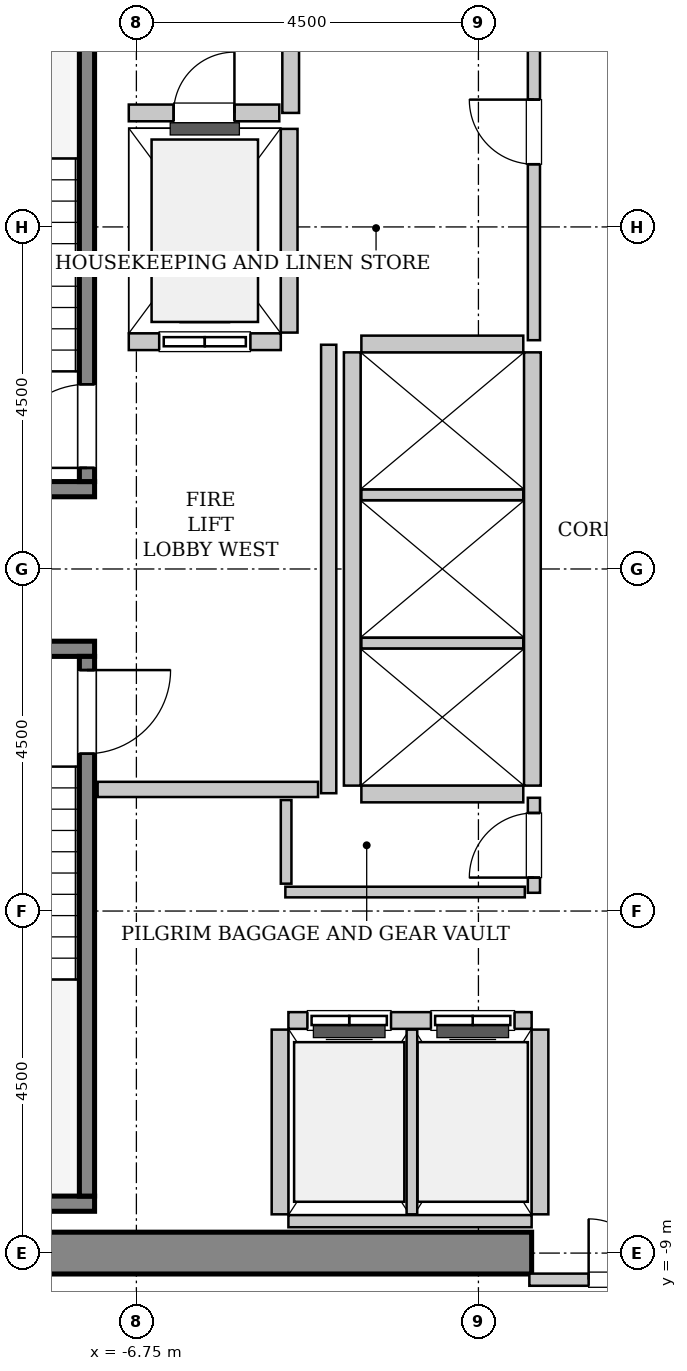
"""IFC4 building model, lengths in metres.
Left out: names, types, materials, properties, quantities, classifications, styles, units other than length and angle.
Written with IfcOpenShell. Run it as: python <this file> out.ifc"""

import sys

from ifc_helpers import new_model, si_unit, direction, frame, frame_2d, origin, place, context, subcontext, project, spatial, rectangle, extrude, source, transform, mapped, element, fill, save


model = new_model("IFC4")
c1 = context("Model", 3, precision=1e-05, world=origin(), true_north=direction((0.0, 1.0)))
c2 = subcontext(c1, "Body", "Model", "MODEL_VIEW")
j1 = project(units=[si_unit("LENGTHUNIT", "METRE"), si_unit("PLANEANGLEUNIT", "RADIAN")], contexts=[c1])
p1 = place(None, origin())
s1 = spatial("IfcSite", under=j1, at=p1, CompositionType="ELEMENT")
p2 = place(p1, origin())
s2 = spatial("IfcBuilding", under=s1, at=p2, CompositionType="ELEMENT")
p3 = place(p2, frame((0.0, 0.0, 190.6)))
s3 = spatial("IfcBuildingStorey", under=s2, at=p3, CompositionType="ELEMENT", Elevation=190.6)
m1 = source(origin(), c2, "Body", "SweptSolid", [
    extrude(rectangle(XDim=9.975, YDim=0.55, at=frame_2d((4.987, 0.0))), origin(), (0.0, 0.0, 1.0), 3.8),
])
p4 = place(p3, frame((-11.525, -9.0, 0.0), z_axis=(0.0, 0.0, 1.0), x_axis=(1.0, 0.0, 0.0)))
e1 = element("IfcWall", 1, at=p4, inside=s3, PredefinedType="SHEAR", context=c2, shape_type="MappedRepresentation", body=[
    mapped(m1, transform((0.0, 0.0, 0.0), x_axis=(1.0, 0.0, 0.0), y_axis=(0.0, 1.0, 0.0), z_axis=(0.0, 0.0, 1.0), scale=1.0)),
])
m2 = source(origin(), c2, "Body", "SweptSolid", [
    extrude(rectangle(XDim=3.4, YDim=0.2, at=frame_2d((1.7, 0.0))), origin(), (0.0, 0.0, 1.0), 3.8),
])
p5 = place(p3, frame((-7.3, 1.05, 0.0), z_axis=(0.0, 0.0, 1.0), x_axis=(-1.0, 0.0, 0.0)))
e2 = element("IfcWall", 2, at=p5, inside=s3, PredefinedType="SOLIDWALL", context=c2, shape_type="MappedRepresentation", body=[
    mapped(m2, transform((0.0, 0.0, 0.0), x_axis=(1.0, 0.0, 0.0), y_axis=(0.0, 1.0, 0.0), z_axis=(0.0, 0.0, 1.0), scale=1.0)),
])
m3 = source(origin(), c2, "Body", "SweptSolid", [
    extrude(rectangle(XDim=7.1, YDim=0.2, at=frame_2d((3.55, 0.0))), origin(), (0.0, 0.0, 1.0), 3.8),
])
p6 = place(p3, frame((-7.4, 1.15, 0.0), z_axis=(0.0, 0.0, 1.0), x_axis=(0.0, 1.0, 0.0)))
e3 = element("IfcWall", 3, at=p6, inside=s3, PredefinedType="SOLIDWALL", context=c2, shape_type="MappedRepresentation", body=[
    mapped(m3, transform((0.0, 0.0, 0.0), x_axis=(1.0, 0.0, 0.0), y_axis=(0.0, 1.0, 0.0), z_axis=(0.0, 0.0, 1.0), scale=1.0)),
])
p7 = place(p6, frame((0.18, 0.0, 0.0)))
e4 = element("IfcOpeningElement", 4, at=p7, cuts=e3, PredefinedType="OPENING", context=c2, shape_type="SweptSolid", body=[
    extrude(rectangle(XDim=1.1, YDim=2.15, at=frame_2d((0.55, 1.075))), frame((0.0, 0.11, 0.0), z_axis=(0.0, -1.0, 0.0), x_axis=(1.0, 0.0, 0.0)), (0.0, 0.0, 1.0), 0.22),
])
p8 = place(p3, frame((-10.7, -1.05, 0.0), z_axis=(0.0, 0.0, 1.0), x_axis=(1.0, 0.0, 0.0)))
e5 = element("IfcWall", 5, at=p8, inside=s3, PredefinedType="SOLIDWALL", context=c2, shape_type="MappedRepresentation", body=[
    mapped(m2, transform((0.0, 0.0, 0.0), x_axis=(1.0, 0.0, 0.0), y_axis=(0.0, 1.0, 0.0), z_axis=(0.0, 0.0, 1.0), scale=1.0)),
])
m4 = source(origin(), c2, "Body", "SweptSolid", [
    extrude(rectangle(XDim=3.68, YDim=0.2, at=frame_2d((1.84, 0.0))), origin(), (0.0, 0.0, 1.0), 3.8),
])
p9 = place(p3, frame((-10.98, -8.35, 0.0), z_axis=(0.0, 0.0, 1.0), x_axis=(1.0, 0.0, 0.0)))
e6 = element("IfcWall", 6, at=p9, inside=s3, PredefinedType="SOLIDWALL", context=c2, shape_type="MappedRepresentation", body=[
    mapped(m4, transform((0.0, 0.0, 0.0), x_axis=(1.0, 0.0, 0.0), y_axis=(0.0, 1.0, 0.0), z_axis=(0.0, 0.0, 1.0), scale=1.0)),
])
p10 = place(p3, frame((-7.4, -1.15, 0.0), z_axis=(0.0, 0.0, 1.0), x_axis=(0.0, -1.0, 0.0)))
e7 = element("IfcWall", 7, at=p10, inside=s3, PredefinedType="SOLIDWALL", context=c2, shape_type="MappedRepresentation", body=[
    mapped(m3, transform((0.0, 0.0, 0.0), x_axis=(1.0, 0.0, 0.0), y_axis=(0.0, 1.0, 0.0), z_axis=(0.0, 0.0, 1.0), scale=1.0)),
])
p11 = place(p10, frame((0.18, 0.0, 0.0)))
e8 = element("IfcOpeningElement", 8, at=p11, cuts=e7, PredefinedType="OPENING", context=c2, shape_type="SweptSolid", body=[
    extrude(rectangle(XDim=1.1, YDim=2.15, at=frame_2d((0.55, 1.075))), frame((0.0, 0.11, 0.0), z_axis=(0.0, -1.0, 0.0), x_axis=(1.0, 0.0, 0.0)), (0.0, 0.0, 1.0), 0.22),
])
m5 = source(origin(), c2, "Body", "SweptSolid", [
    extrude(rectangle(XDim=2.0, YDim=0.22, at=frame_2d((1.0, 0.0))), origin(), (0.0, 0.0, 1.0), 3.535),
])
p12 = place(p3, frame((-6.85, 2.99, 0.0), z_axis=(0.0, 0.0, 1.0), x_axis=(1.0, 0.0, 0.0)))
e9 = element("IfcWall", 9, at=p12, inside=s3, PredefinedType="SOLIDWALL", context=c2, shape_type="MappedRepresentation", body=[
    mapped(m5, transform((0.0, 0.0, 0.0), x_axis=(1.0, 0.0, 0.0), y_axis=(0.0, 1.0, 0.0), z_axis=(0.0, 0.0, 1.0), scale=1.0)),
])
p13 = place(p12, frame((0.4, 0.0, 0.0)))
e10 = element("IfcOpeningElement", 10, at=p13, cuts=e9, PredefinedType="OPENING", context=c2, shape_type="SweptSolid", body=[
    extrude(rectangle(XDim=1.2, YDim=2.2, at=frame_2d((0.6, 1.1))), frame((0.0, 0.12, 0.0), z_axis=(0.0, -1.0, 0.0), x_axis=(1.0, 0.0, 0.0)), (0.0, 0.0, 1.0), 0.24),
])
m6 = source(origin(), c2, "Body", "SweptSolid", [
    extrude(rectangle(XDim=2.68, YDim=0.22, at=frame_2d((1.34, 0.0))), origin(), (0.0, 0.0, 1.0), 3.535),
])
p14 = place(p3, frame((-4.74, 3.11, 0.0), z_axis=(0.0, 0.0, 1.0), x_axis=(0.0, 1.0, 0.0)))
e11 = element("IfcWall", 11, at=p14, inside=s3, PredefinedType="SOLIDWALL", context=c2, shape_type="MappedRepresentation", body=[
    mapped(m6, transform((0.0, 0.0, 0.0), x_axis=(1.0, 0.0, 0.0), y_axis=(0.0, 1.0, 0.0), z_axis=(0.0, 0.0, 1.0), scale=1.0)),
])
m7 = source(origin(), c2, "Body", "SweptSolid", [
    extrude(rectangle(XDim=3.2, YDim=0.22, at=frame_2d((1.6, 0.0))), origin(), (0.0, 0.0, 1.0), 3.535),
])
p15 = place(p3, frame((-1.55, -5.94, 0.0), z_axis=(0.0, 0.0, 1.0), x_axis=(-1.0, 0.0, 0.0)))
e12 = element("IfcWall", 12, at=p15, inside=s3, PredefinedType="SOLIDWALL", context=c2, shape_type="MappedRepresentation", body=[
    mapped(m7, transform((0.0, 0.0, 0.0), x_axis=(1.0, 0.0, 0.0), y_axis=(0.0, 1.0, 0.0), z_axis=(0.0, 0.0, 1.0), scale=1.0)),
])
p16 = place(p15, frame((1.85, 0.0, 0.0)))
e13 = element("IfcOpeningElement", 13, at=p16, cuts=e12, PredefinedType="OPENING", context=c2, shape_type="SweptSolid", body=[
    extrude(rectangle(XDim=1.1, YDim=2.2, at=frame_2d((0.55, 1.1))), frame((0.0, 0.12, 0.0), z_axis=(0.0, -1.0, 0.0), x_axis=(1.0, 0.0, 0.0)), (0.0, 0.0, 1.0), 0.24),
])
p17 = place(p15, frame((0.225, 0.0, 0.0)))
e14 = element("IfcOpeningElement", 14, at=p17, cuts=e12, PredefinedType="OPENING", context=c2, shape_type="SweptSolid", body=[
    extrude(rectangle(XDim=1.1, YDim=2.2, at=frame_2d((0.55, 1.1))), frame((0.0, 0.12, 0.0), z_axis=(0.0, -1.0, 0.0), x_axis=(1.0, 0.0, 0.0)), (0.0, 0.0, 1.0), 0.24),
])
m8 = source(origin(), c2, "Body", "SweptSolid", [
    extrude(rectangle(XDim=3.2, YDim=0.16, at=frame_2d((1.6, 0.0))), origin(), (0.0, 0.0, 1.0), 2.425),
])
p18 = place(p3, frame((-4.75, -8.58, 0.0), z_axis=(0.0, 0.0, 1.0), x_axis=(1.0, 0.0, 0.0)))
e15 = element("IfcWall", 15, at=p18, inside=s3, PredefinedType="PARTITIONING", context=c2, shape_type="MappedRepresentation", body=[
    mapped(m8, transform((0.0, 0.0, 0.0), x_axis=(1.0, 0.0, 0.0), y_axis=(0.0, 1.0, 0.0), z_axis=(0.0, 0.0, 1.0), scale=1.0)),
])
m9 = source(origin(), c2, "Body", "SweptSolid", [
    extrude(rectangle(XDim=2.43, YDim=0.22, at=frame_2d((1.215, 0.0))), origin(), (0.0, 0.0, 1.0), 3.535),
])
p19 = place(p3, frame((-4.86, -6.06, 0.0), z_axis=(0.0, 0.0, 1.0), x_axis=(0.0, -1.0, 0.0)))
e16 = element("IfcWall", 16, at=p19, inside=s3, PredefinedType="SOLIDWALL", context=c2, shape_type="MappedRepresentation", body=[
    mapped(m9, transform((0.0, 0.0, 0.0), x_axis=(1.0, 0.0, 0.0), y_axis=(0.0, 1.0, 0.0), z_axis=(0.0, 0.0, 1.0), scale=1.0)),
])
m10 = source(origin(), c2, "Body", "SweptSolid", [
    extrude(rectangle(XDim=2.43, YDim=0.14, at=frame_2d((1.215, 0.0))), origin(), (0.0, 0.0, 1.0), 3.535),
])
p20 = place(p3, frame((-3.125, -8.49, 0.0), z_axis=(0.0, 0.0, 1.0), x_axis=(0.0, 1.0, 0.0)))
e17 = element("IfcWall", 17, at=p20, inside=s3, PredefinedType="PARTITIONING", context=c2, shape_type="MappedRepresentation", body=[
    mapped(m10, transform((0.0, 0.0, 0.0), x_axis=(1.0, 0.0, 0.0), y_axis=(0.0, 1.0, 0.0), z_axis=(0.0, 0.0, 1.0), scale=1.0)),
])
p21 = place(p3, frame((-1.44, -8.49, 0.0), z_axis=(0.0, 0.0, 1.0), x_axis=(0.0, 1.0, 0.0)))
e18 = element("IfcWall", 18, at=p21, inside=s3, PredefinedType="SOLIDWALL", context=c2, shape_type="MappedRepresentation", body=[
    mapped(m9, transform((0.0, 0.0, 0.0), x_axis=(1.0, 0.0, 0.0), y_axis=(0.0, 1.0, 0.0), z_axis=(0.0, 0.0, 1.0), scale=1.0)),
])
m11 = source(origin(), c2, "Body", "SweptSolid", [
    extrude(rectangle(XDim=5.7, YDim=0.22, at=frame_2d((2.85, 0.0))), origin(), (0.0, 0.0, 1.0), 3.535),
])
for number, where, z_axis, x_axis in (
    (19, (-1.54, -2.85, 0.0), (0.0, 0.0, 1.0), (0.0, 1.0, 0.0)),
    (20, (-3.91, 2.85, 0.0), (0.0, 0.0, 1.0), (0.0, -1.0, 0.0)),
):
    element("IfcWall", number, at=place(p3, frame(where, z_axis=z_axis, x_axis=x_axis)), inside=s3, PredefinedType="SOLIDWALL", context=c2, shape_type="MappedRepresentation", body=[
        mapped(m11, transform((0.0, 0.0, 0.0), x_axis=(1.0, 0.0, 0.0), y_axis=(0.0, 1.0, 0.0), z_axis=(0.0, 0.0, 1.0), scale=1.0)),
    ])
m12 = source(origin(), c2, "Body", "SweptSolid", [
    extrude(rectangle(XDim=2.13, YDim=0.22, at=frame_2d((1.065, 0.0))), origin(), (0.0, 0.0, 1.0), 3.535),
])
p22 = place(p3, frame((-3.79, -2.96, 0.0), z_axis=(0.0, 0.0, 1.0), x_axis=(1.0, 0.0, 0.0)))
e21 = element("IfcWall", 21, at=p22, inside=s3, PredefinedType="SOLIDWALL", context=c2, shape_type="MappedRepresentation", body=[
    mapped(m12, transform((0.0, 0.0, 0.0), x_axis=(1.0, 0.0, 0.0), y_axis=(0.0, 1.0, 0.0), z_axis=(0.0, 0.0, 1.0), scale=1.0)),
])
m13 = source(origin(), c2, "Body", "SweptSolid", [
    extrude(rectangle(XDim=2.13, YDim=0.14, at=frame_2d((1.065, 0.0))), origin(), (0.0, 0.0, 1.0), 3.535),
])
for number, where, z_axis, x_axis in (
    (22, (-3.79, -0.975, 0.0), (0.0, 0.0, 1.0), (1.0, 0.0, 0.0)),
    (23, (-3.79, 0.975, 0.0), (0.0, 0.0, 1.0), (1.0, 0.0, 0.0)),
):
    element("IfcWall", number, at=place(p3, frame(where, z_axis=z_axis, x_axis=x_axis)), inside=s3, PredefinedType="PARTITIONING", context=c2, shape_type="MappedRepresentation", body=[
        mapped(m13, transform((0.0, 0.0, 0.0), x_axis=(1.0, 0.0, 0.0), y_axis=(0.0, 1.0, 0.0), z_axis=(0.0, 0.0, 1.0), scale=1.0)),
    ])
p23 = place(p3, frame((-1.66, 2.96, 0.0), z_axis=(0.0, 0.0, 1.0), x_axis=(-1.0, 0.0, 0.0)))
e24 = element("IfcWall", 24, at=p23, inside=s3, PredefinedType="SOLIDWALL", context=c2, shape_type="MappedRepresentation", body=[
    mapped(m12, transform((0.0, 0.0, 0.0), x_axis=(1.0, 0.0, 0.0), y_axis=(0.0, 1.0, 0.0), z_axis=(0.0, 0.0, 1.0), scale=1.0)),
])
m14 = source(origin(), c2, "Body", "SweptSolid", [
    extrude(rectangle(XDim=2.25, YDim=0.22, at=frame_2d((1.125, 0.0))), origin(), (0.0, 0.0, 1.0), 3.535),
])
p24 = place(p3, frame((-4.72, 6.0, 0.0), z_axis=(0.0, 0.0, 1.0), x_axis=(0.0, 1.0, 0.0)))
e25 = element("IfcWall", 25, at=p24, inside=s3, PredefinedType="SOLIDWALL", context=c2, shape_type="MappedRepresentation", body=[
    mapped(m14, transform((0.0, 0.0, 0.0), x_axis=(1.0, 0.0, 0.0), y_axis=(0.0, 1.0, 0.0), z_axis=(0.0, 0.0, 1.0), scale=1.0)),
])
m15 = source(origin(), c2, "Body", "SweptSolid", [
    extrude(rectangle(XDim=1.98, YDim=0.22, at=frame_2d((0.99, 0.0))), origin(), (0.0, 0.0, 1.0), 3.535),
])
p25 = place(p3, frame((-6.85, 6.0, 0.0), z_axis=(0.0, 0.0, 1.0), x_axis=(1.0, 0.0, 0.0)))
e26 = element("IfcWall", 26, at=p25, inside=s3, PredefinedType="SOLIDWALL", context=c2, shape_type="MappedRepresentation", body=[
    mapped(m15, transform((0.0, 0.0, 0.0), x_axis=(1.0, 0.0, 0.0), y_axis=(0.0, 1.0, 0.0), z_axis=(0.0, 0.0, 1.0), scale=1.0)),
])
p26 = place(p25, frame((0.59, 0.0, 0.0)))
e27 = element("IfcOpeningElement", 27, at=p26, cuts=e26, PredefinedType="OPENING", context=c2, shape_type="SweptSolid", body=[
    extrude(rectangle(XDim=0.8, YDim=2.0, at=frame_2d((0.4, 1.0))), frame((0.0, 0.12, 0.0), z_axis=(0.0, -1.0, 0.0), x_axis=(1.0, 0.0, 0.0)), (0.0, 0.0, 1.0), 0.24),
])
m16 = source(origin(), c2, "Body", "SweptSolid", [
    extrude(rectangle(XDim=5.9, YDim=0.2, at=frame_2d((2.95, 0.0))), origin(), (0.0, 0.0, 1.0), 3.535),
])
p27 = place(p3, frame((-4.22, -2.95, 0.0), z_axis=(0.0, 0.0, 1.0), x_axis=(0.0, 1.0, 0.0)))
e28 = element("IfcWall", 28, at=p27, inside=s3, PredefinedType="PARTITIONING", context=c2, shape_type="MappedRepresentation", body=[
    mapped(m16, transform((0.0, 0.0, 0.0), x_axis=(1.0, 0.0, 0.0), y_axis=(0.0, 1.0, 0.0), z_axis=(0.0, 0.0, 1.0), scale=1.0)),
])
m17 = source(origin(), c2, "Body", "SweptSolid", [
    extrude(rectangle(XDim=2.9, YDim=0.2, at=frame_2d((1.45, 0.0))), origin(), (0.0, 0.0, 1.0), 3.535),
])
p28 = place(p3, frame((-7.26, -2.9, 0.0), z_axis=(0.0, 0.0, 1.0), x_axis=(1.0, 0.0, 0.0)))
e29 = element("IfcWall", 29, at=p28, inside=s3, PredefinedType="PARTITIONING", context=c2, shape_type="MappedRepresentation", body=[
    mapped(m17, transform((0.0, 0.0, 0.0), x_axis=(1.0, 0.0, 0.0), y_axis=(0.0, 1.0, 0.0), z_axis=(0.0, 0.0, 1.0), scale=1.0)),
])
m18 = source(origin(), c2, "Body", "SweptSolid", [
    extrude(rectangle(XDim=3.16, YDim=0.16, at=frame_2d((1.58, 0.0))), origin(), (0.0, 0.0, 1.0), 2.425),
])
p29 = place(p3, frame((-1.58, -9.35, 0.0), z_axis=(0.0, 0.0, 1.0), x_axis=(1.0, 0.0, 0.0)))
e30 = element("IfcWall", 30, at=p29, inside=s3, PredefinedType="PARTITIONING", context=c2, shape_type="MappedRepresentation", body=[
    mapped(m18, transform((0.0, 0.0, 0.0), x_axis=(1.0, 0.0, 0.0), y_axis=(0.0, 1.0, 0.0), z_axis=(0.0, 0.0, 1.0), scale=1.0)),
])
p30 = place(p29, frame((0.78, 0.0, 0.0)))
e31 = element("IfcOpeningElement", 31, at=p30, cuts=e30, PredefinedType="OPENING", context=c2, shape_type="SweptSolid", body=[
    extrude(rectangle(XDim=1.6, YDim=2.3, at=frame_2d((0.8, 1.15))), frame((0.0, 0.09, 0.0), z_axis=(0.0, -1.0, 0.0), x_axis=(1.0, 0.0, 0.0)), (0.0, 0.0, 1.0), 0.18),
])
m19 = source(origin(), c2, "Body", "SweptSolid", [
    extrude(rectangle(XDim=5.48, YDim=0.16, at=frame_2d((2.74, 0.0))), origin(), (0.0, 0.0, 1.0), 3.535),
])
p31 = place(p3, frame((-1.52, 3.01, 0.0), z_axis=(0.0, 0.0, 1.0), x_axis=(0.0, 1.0, 0.0)))
e32 = element("IfcWall", 32, at=p31, inside=s3, PredefinedType="PARTITIONING", context=c2, shape_type="MappedRepresentation", body=[
    mapped(m19, transform((0.0, 0.0, 0.0), x_axis=(1.0, 0.0, 0.0), y_axis=(0.0, 1.0, 0.0), z_axis=(0.0, 0.0, 1.0), scale=1.0)),
])
p32 = place(p31, frame((2.315, 0.0, 0.0)))
e33 = element("IfcOpeningElement", 33, at=p32, cuts=e32, PredefinedType="OPENING", context=c2, shape_type="SweptSolid", body=[
    extrude(rectangle(XDim=0.85, YDim=2.1, at=frame_2d((0.425, 1.05))), frame((0.0, 0.09, 0.0), z_axis=(0.0, -1.0, 0.0), x_axis=(1.0, 0.0, 0.0)), (0.0, 0.0, 1.0), 0.18),
])
m20 = source(origin(), c2, "Body", "SweptSolid", [
    extrude(rectangle(XDim=1.25, YDim=0.16, at=frame_2d((0.625, 0.0))), origin(), (0.0, 0.0, 1.0), 3.535),
])
p33 = place(p3, frame((-1.52, -4.26, 0.0), z_axis=(0.0, 0.0, 1.0), x_axis=(0.0, 1.0, 0.0)))
e34 = element("IfcWall", 34, at=p33, inside=s3, PredefinedType="PARTITIONING", context=c2, shape_type="MappedRepresentation", body=[
    mapped(m20, transform((0.0, 0.0, 0.0), x_axis=(1.0, 0.0, 0.0), y_axis=(0.0, 1.0, 0.0), z_axis=(0.0, 0.0, 1.0), scale=1.0)),
])
p34 = place(p33, frame((0.2, 0.0, 0.0)))
e35 = element("IfcOpeningElement", 35, at=p34, cuts=e34, PredefinedType="OPENING", context=c2, shape_type="SweptSolid", body=[
    extrude(rectangle(XDim=0.85, YDim=2.1, at=frame_2d((0.425, 1.05))), frame((0.0, 0.09, 0.0), z_axis=(0.0, -1.0, 0.0), x_axis=(1.0, 0.0, 0.0)), (0.0, 0.0, 1.0), 0.18),
])
m21 = source(origin(), c2, "Body", "SweptSolid", [
    extrude(rectangle(XDim=3.15, YDim=0.14, at=frame_2d((1.575, 0.0))), origin(), (0.0, 0.0, 1.0), 3.535),
])
p35 = place(p3, frame((-4.79, -4.25, 0.0), z_axis=(0.0, 0.0, 1.0), x_axis=(1.0, 0.0, 0.0)))
e36 = element("IfcWall", 36, at=p35, inside=s3, PredefinedType="PARTITIONING", context=c2, shape_type="MappedRepresentation", body=[
    mapped(m21, transform((0.0, 0.0, 0.0), x_axis=(1.0, 0.0, 0.0), y_axis=(0.0, 1.0, 0.0), z_axis=(0.0, 0.0, 1.0), scale=1.0)),
])
m22 = source(origin(), c2, "Body", "SweptSolid", [
    extrude(rectangle(XDim=1.1, YDim=0.14, at=frame_2d((0.55, 0.0))), origin(), (0.0, 0.0, 1.0), 3.535),
])
p36 = place(p3, frame((-4.78, -4.14, 0.0), z_axis=(0.0, 0.0, 1.0), x_axis=(0.0, 1.0, 0.0)))
e37 = element("IfcWall", 37, at=p36, inside=s3, PredefinedType="PARTITIONING", context=c2, shape_type="MappedRepresentation", body=[
    mapped(m22, transform((0.0, 0.0, 0.0), x_axis=(1.0, 0.0, 0.0), y_axis=(0.0, 1.0, 0.0), z_axis=(0.0, 0.0, 1.0), scale=1.0)),
])
m23 = source(origin(), c2, "Body", "SweptSolid", [
    extrude(rectangle(XDim=1.1, YDim=2.15, at=frame_2d((0.55, 1.075))), frame((0.0, 0.025, 0.0), z_axis=(0.0, -1.0, 0.0), x_axis=(1.0, 0.0, 0.0)), (0.0, 0.0, 1.0), 0.05),
])
p37 = place(p7, origin())
e38 = element("IfcDoor", 38, at=p37, inside=s3, OperationType="SINGLE_SWING_LEFT", PredefinedType="DOOR", context=c2, shape_type="MappedRepresentation", body=[
    mapped(m23, transform((0.0, 0.0, 0.0), x_axis=(1.0, 0.0, 0.0), y_axis=(0.0, 1.0, 0.0), z_axis=(0.0, 0.0, 1.0), scale=1.0)),
])
fill(e4, e38)
p38 = place(p11, origin())
e39 = element("IfcDoor", 39, at=p38, inside=s3, OperationType="SINGLE_SWING_LEFT", PredefinedType="DOOR", context=c2, shape_type="MappedRepresentation", body=[
    mapped(m23, transform((0.0, 0.0, 0.0), x_axis=(1.0, 0.0, 0.0), y_axis=(0.0, 1.0, 0.0), z_axis=(0.0, 0.0, 1.0), scale=1.0)),
])
fill(e8, e39)
m24 = source(origin(), c2, "Body", "SweptSolid", [
    extrude(rectangle(XDim=1.2, YDim=2.2, at=frame_2d((0.6, 1.1))), frame((0.0, 0.025, 0.0), z_axis=(0.0, -1.0, 0.0), x_axis=(1.0, 0.0, 0.0)), (0.0, 0.0, 1.0), 0.05),
])
p39 = place(p13, origin())
e40 = element("IfcDoor", 40, at=p39, inside=s3, OperationType="SLIDING_TO_LEFT", PredefinedType="DOOR", context=c2, shape_type="MappedRepresentation", body=[
    mapped(m24, transform((0.0, 0.0, 0.0), x_axis=(1.0, 0.0, 0.0), y_axis=(0.0, 1.0, 0.0), z_axis=(0.0, 0.0, 1.0), scale=1.0)),
])
fill(e10, e40)
m25 = source(origin(), c2, "Body", "SweptSolid", [
    extrude(rectangle(XDim=1.1, YDim=2.2, at=frame_2d((0.55, 1.1))), frame((0.0, 0.025, 0.0), z_axis=(0.0, -1.0, 0.0), x_axis=(1.0, 0.0, 0.0)), (0.0, 0.0, 1.0), 0.05),
])
p40 = place(p16, origin())
e41 = element("IfcDoor", 41, at=p40, inside=s3, OperationType="DOUBLE_DOOR_SLIDING", PredefinedType="DOOR", context=c2, shape_type="MappedRepresentation", body=[
    mapped(m25, transform((0.0, 0.0, 0.0), x_axis=(1.0, 0.0, 0.0), y_axis=(0.0, 1.0, 0.0), z_axis=(0.0, 0.0, 1.0), scale=1.0)),
])
fill(e13, e41)
p41 = place(p17, origin())
e42 = element("IfcDoor", 42, at=p41, inside=s3, OperationType="DOUBLE_DOOR_SLIDING", PredefinedType="DOOR", context=c2, shape_type="MappedRepresentation", body=[
    mapped(m25, transform((0.0, 0.0, 0.0), x_axis=(1.0, 0.0, 0.0), y_axis=(0.0, 1.0, 0.0), z_axis=(0.0, 0.0, 1.0), scale=1.0)),
])
fill(e14, e42)
m26 = source(origin(), c2, "Body", "SweptSolid", [
    extrude(rectangle(XDim=0.8, YDim=2.0, at=frame_2d((0.4, 1.0))), frame((0.0, 0.025, 0.0), z_axis=(0.0, -1.0, 0.0), x_axis=(1.0, 0.0, 0.0)), (0.0, 0.0, 1.0), 0.05),
])
p42 = place(p26, origin())
e43 = element("IfcDoor", 43, at=p42, inside=s3, OperationType="SINGLE_SWING_RIGHT", PredefinedType="TRAPDOOR", context=c2, shape_type="MappedRepresentation", body=[
    mapped(m26, transform((0.0, 0.0, 0.0), x_axis=(1.0, 0.0, 0.0), y_axis=(0.0, 1.0, 0.0), z_axis=(0.0, 0.0, 1.0), scale=1.0)),
])
fill(e27, e43)
m27 = source(origin(), c2, "Body", "SweptSolid", [
    extrude(rectangle(XDim=1.6, YDim=2.3, at=frame_2d((0.8, 1.15))), frame((0.0, 0.025, 0.0), z_axis=(0.0, -1.0, 0.0), x_axis=(1.0, 0.0, 0.0)), (0.0, 0.0, 1.0), 0.05),
])
p43 = place(p30, origin())
e44 = element("IfcDoor", 44, at=p43, inside=s3, OperationType="DOUBLE_DOOR_SINGLE_SWING", PredefinedType="DOOR", context=c2, shape_type="MappedRepresentation", body=[
    mapped(m27, transform((0.0, 0.0, 0.0), x_axis=(1.0, 0.0, 0.0), y_axis=(0.0, 1.0, 0.0), z_axis=(0.0, 0.0, 1.0), scale=1.0)),
])
fill(e31, e44)
m28 = source(origin(), c2, "Body", "SweptSolid", [
    extrude(rectangle(XDim=0.85, YDim=2.1, at=frame_2d((0.425, 1.05))), frame((0.0, 0.025, 0.0), z_axis=(0.0, -1.0, 0.0), x_axis=(1.0, 0.0, 0.0)), (0.0, 0.0, 1.0), 0.05),
])
p44 = place(p32, origin())
e45 = element("IfcDoor", 45, at=p44, inside=s3, OperationType="SINGLE_SWING_RIGHT", PredefinedType="DOOR", context=c2, shape_type="MappedRepresentation", body=[
    mapped(m28, transform((0.0, 0.0, 0.0), x_axis=(1.0, 0.0, 0.0), y_axis=(0.0, 1.0, 0.0), z_axis=(0.0, 0.0, 1.0), scale=1.0)),
])
fill(e33, e45)
p45 = place(p34, origin())
e46 = element("IfcDoor", 46, at=p45, inside=s3, OperationType="SINGLE_SWING_LEFT", PredefinedType="DOOR", context=c2, shape_type="MappedRepresentation", body=[
    mapped(m28, transform((0.0, 0.0, 0.0), x_axis=(1.0, 0.0, 0.0), y_axis=(0.0, 1.0, 0.0), z_axis=(0.0, 0.0, 1.0), scale=1.0)),
])
fill(e35, e46)
save(model, sys.argv[1])
